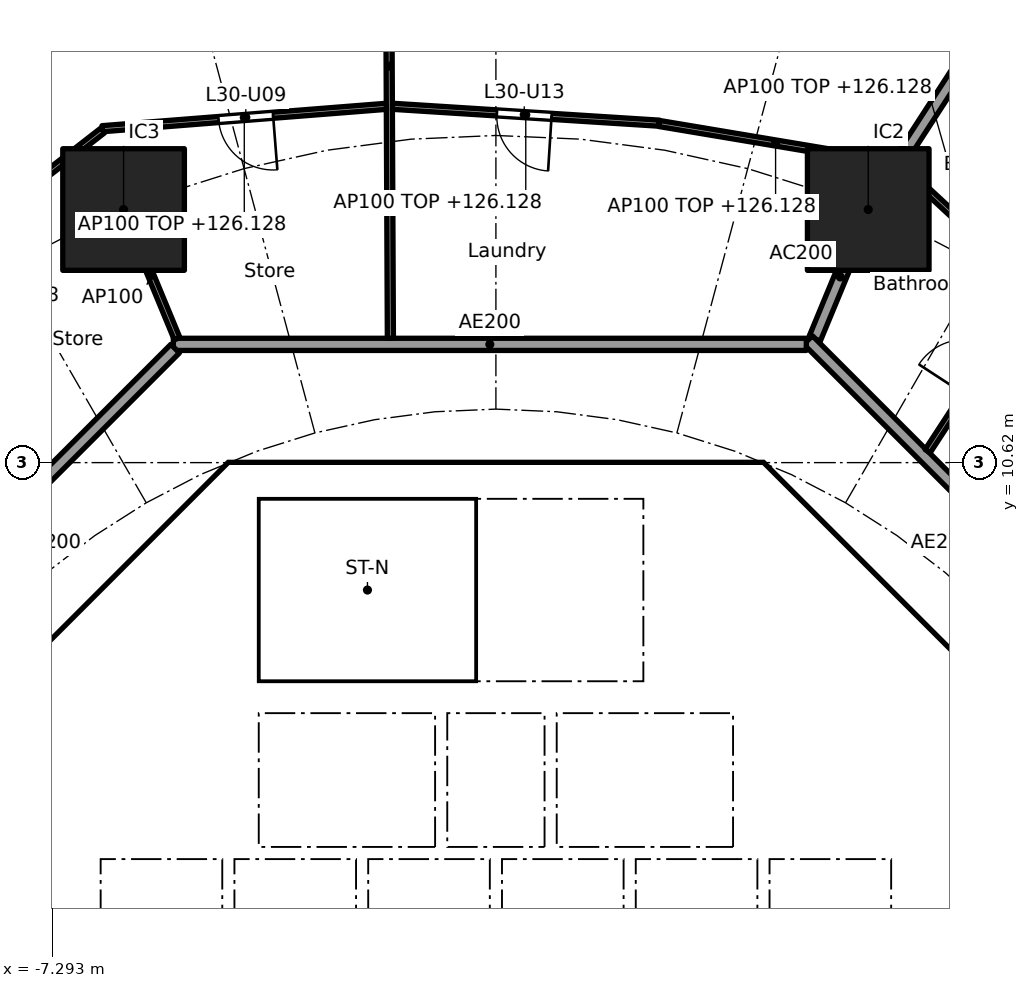
"""IFC4 building model, lengths in metres.
Left out: names, types, materials, properties, quantities, classifications, styles, units other than length and angle.
Written with IfcOpenShell. Run it as: python <this file> out.ifc"""

import sys

from ifc_helpers import new_model, si_unit, direction, frame, frame_2d, origin, origin_2d, place, context, subcontext, project, spatial, polyline, rectangle, outline, extrude, element, fill, save


model = new_model("IFC4")
c1 = context("Model", 3, precision=1e-05, world=origin(), true_north=direction((0.0, 1.0)))
c2 = subcontext(c1, "Body", "Model", "MODEL_VIEW")
j1 = project(units=[si_unit("LENGTHUNIT", "METRE"), si_unit("PLANEANGLEUNIT", "RADIAN")], contexts=[c1])
p1 = place(None, origin())
s1 = spatial("IfcSite", under=j1, at=p1, CompositionType="ELEMENT")
p2 = place(p1, origin())
s2 = spatial("IfcBuilding", under=s1, at=p2, CompositionType="ELEMENT")
p3 = place(p2, frame((0.0, 0.0, 123.3)))
s3 = spatial("IfcBuildingStorey", under=s2, at=p3, CompositionType="ELEMENT", Elevation=123.3)
for number, where, z_axis, x_axis in (
    (1, (6.123, 14.782, 0.0), (0.0, 0.0, 1.0), (1.0, 0.0, 0.0)),
    (2, (-6.123, 14.782, 0.0), (0.0, 0.0, 1.0), (1.0, 0.0, 0.0)),
):
    element("IfcColumn", number, at=place(p3, frame(where, z_axis=z_axis, x_axis=x_axis)), inside=s3, PredefinedType="COLUMN", context=c2, shape_type="SweptSolid", body=[
        extrude(rectangle(XDim=2.0, YDim=2.0, at=origin_2d()), origin(), (0.0, 0.0, 1.0), 3.7),
    ])
p4 = place(p3, frame((9.988, 4.613, 0.0), z_axis=(0.0, 0.0, 1.0), x_axis=(-0.707106781187, 0.707106781187, 0.0)))
e3 = element("IfcWall", 3, at=p4, inside=s3, PredefinedType="SHEAR", context=c2, shape_type="SweptSolid", body=[
    extrude(rectangle(XDim=7.602, YDim=0.6, at=frame_2d((3.801, 0.0))), origin(), (0.0, 0.0, 1.0), 3.44),
])
p5 = place(p4, frame((3.201, 0.0, 0.0)))
e4 = element("IfcOpeningElement", 4, at=p5, cuts=e3, PredefinedType="OPENING", context=c2, shape_type="SweptSolid", body=[
    extrude(rectangle(XDim=1.2, YDim=2.1, at=frame_2d((0.6, 1.05))), frame((0.0, 0.31, 0.0), z_axis=(0.0, -1.0, 0.0), x_axis=(1.0, 0.0, 0.0)), (0.0, 0.0, 1.0), 0.62),
])
p6 = place(p3, frame((-4.613, 9.988, 0.0), z_axis=(0.0, 0.0, 1.0), x_axis=(-0.707106781187, -0.707106781187, 0.0)))
e5 = element("IfcWall", 5, at=p6, inside=s3, PredefinedType="SHEAR", context=c2, shape_type="SweptSolid", body=[
    extrude(rectangle(XDim=7.602, YDim=0.6, at=frame_2d((3.801, 0.0))), origin(), (0.0, 0.0, 1.0), 3.44),
])
p7 = place(p6, frame((0.351, 0.0, 0.0)))
e6 = element("IfcOpeningElement", 6, at=p7, cuts=e5, PredefinedType="OPENING", context=c2, shape_type="SweptSolid", body=[
    extrude(rectangle(XDim=1.1, YDim=2.1, at=frame_2d((0.55, 1.05))), frame((0.0, 0.31, 0.0), z_axis=(0.0, -1.0, 0.0), x_axis=(1.0, 0.0, 0.0)), (0.0, 0.0, 1.0), 0.62),
])
p8 = place(p3, frame((-5.8, 4.3, 0.0), z_axis=(0.0, 0.0, 1.0), x_axis=(0.0, 1.0, 0.0)))
e7 = element("IfcWall", 7, at=p8, inside=s3, PredefinedType="PARTITIONING", context=c2, shape_type="SweptSolid", body=[
    extrude(rectangle(XDim=3.927, YDim=0.15, at=frame_2d((1.963, 0.0))), origin(), (0.0, 0.0, 1.0), 3.44),
])
p9 = place(p8, frame((1.551, 0.0, 0.0)))
e8 = element("IfcOpeningElement", 8, at=p9, cuts=e7, PredefinedType="OPENING", context=c2, shape_type="SweptSolid", body=[
    extrude(rectangle(XDim=0.9, YDim=2.1, at=frame_2d((0.45, 1.05))), frame((0.0, 0.085, 0.0), z_axis=(0.0, -1.0, 0.0), x_axis=(1.0, 0.0, 0.0)), (0.0, 0.0, 1.0), 0.17),
])
p10 = place(p3, frame((4.0, 4.3, 0.0), z_axis=(0.0, 0.0, 1.0), x_axis=(0.0, 1.0, 0.0)))
e9 = element("IfcWall", 9, at=p10, inside=s3, PredefinedType="SOLIDWALL", context=c2, shape_type="SweptSolid", body=[
    extrude(rectangle(XDim=2.2, YDim=0.2, at=frame_2d((1.1, 0.0))), origin(), (0.0, 0.0, 1.0), 3.44),
])
p11 = place(p10, frame((0.55, 0.0, 0.0)))
e10 = element("IfcOpeningElement", 10, at=p11, cuts=e9, PredefinedType="OPENING", context=c2, shape_type="SweptSolid", body=[
    extrude(rectangle(XDim=1.1, YDim=2.1, at=frame_2d((0.55, 1.05))), frame((0.0, 0.11, 0.0), z_axis=(0.0, -1.0, 0.0), x_axis=(1.0, 0.0, 0.0)), (0.0, 0.0, 1.0), 0.22),
])
p12 = place(p3, frame((-4.0, 4.3, 0.0), z_axis=(0.0, 0.0, 1.0), x_axis=(0.0, 1.0, 0.0)))
e11 = element("IfcWall", 11, at=p12, inside=s3, PredefinedType="SOLIDWALL", context=c2, shape_type="SweptSolid", body=[
    extrude(rectangle(XDim=2.2, YDim=0.2, at=frame_2d((1.1, 0.0))), origin(), (0.0, 0.0, 1.0), 3.44),
])
p13 = place(p12, frame((0.55, 0.0, 0.0)))
e12 = element("IfcOpeningElement", 12, at=p13, cuts=e11, PredefinedType="OPENING", context=c2, shape_type="SweptSolid", body=[
    extrude(rectangle(XDim=1.1, YDim=2.1, at=frame_2d((0.55, 1.05))), frame((0.0, 0.11, 0.0), z_axis=(0.0, -1.0, 0.0), x_axis=(1.0, 0.0, 0.0)), (0.0, 0.0, 1.0), 0.22),
])
p14 = place(p3, frame((6.7, 4.0, 0.0), z_axis=(0.0, 0.0, 1.0), x_axis=(1.0, 0.0, 0.0)))
e13 = element("IfcWall", 13, at=p14, inside=s3, PredefinedType="SOLIDWALL", context=c2, shape_type="SweptSolid", body=[
    extrude(rectangle(XDim=3.325, YDim=0.2, at=frame_2d((1.662, 0.0))), origin(), (0.0, 0.0, 1.0), 3.44),
])
p15 = place(p14, frame((1.25, 0.0, 0.0)))
e14 = element("IfcOpeningElement", 14, at=p15, cuts=e13, PredefinedType="OPENING", context=c2, shape_type="SweptSolid", body=[
    extrude(rectangle(XDim=1.1, YDim=2.1, at=frame_2d((0.55, 1.05))), frame((0.0, 0.11, 0.0), z_axis=(0.0, -1.0, 0.0), x_axis=(1.0, 0.0, 0.0)), (0.0, 0.0, 1.0), 0.22),
])
p16 = place(p3, frame((4.0, 7.025, 0.0), z_axis=(0.0, 0.0, 1.0), x_axis=(0.0, 1.0, 0.0)))
e15 = element("IfcWall", 15, at=p16, inside=s3, PredefinedType="SOLIDWALL", context=c2, shape_type="SweptSolid", body=[
    extrude(rectangle(XDim=3.0, YDim=0.2, at=frame_2d((1.5, 0.0))), origin(), (0.0, 0.0, 1.0), 3.44),
])
p17 = place(p16, frame((0.925, 0.0, 0.0)))
e16 = element("IfcOpeningElement", 16, at=p17, cuts=e15, PredefinedType="OPENING", context=c2, shape_type="SweptSolid", body=[
    extrude(rectangle(XDim=1.1, YDim=2.1, at=frame_2d((0.55, 1.05))), frame((0.0, 0.11, 0.0), z_axis=(0.0, -1.0, 0.0), x_axis=(1.0, 0.0, 0.0)), (0.0, 0.0, 1.0), 0.22),
])
p18 = place(p3, origin())
e17 = element("IfcWall", 17, at=p18, inside=s3, PredefinedType="SHEAR", context=c2, shape_type="SweptSolid", body=[
    extrude(outline(polyline([(-4.152, 10.025), (-4.401, 9.776), (-4.825, 10.2), (-4.401, 10.625), (4.401, 10.625), (4.825, 10.2), (4.401, 9.776), (4.152, 10.025), (-4.152, 10.025)])), origin(), (0.0, 0.0, 1.0), 3.44),
])
for number, where, z_axis, x_axis in (
    (18, (-0.9, 4.3, 0.0), (0.0, 0.0, 1.0), (0.0, 1.0, 0.0)),
    (19, (0.9, 4.3, 0.0), (0.0, 0.0, 1.0), (0.0, 1.0, 0.0)),
):
    element("IfcWall", number, at=place(p3, frame(where, z_axis=z_axis, x_axis=x_axis)), inside=s3, PredefinedType="SOLIDWALL", context=c2, shape_type="SweptSolid", body=[
        extrude(rectangle(XDim=2.2, YDim=0.2, at=frame_2d((1.1, 0.0))), origin(), (0.0, 0.0, 1.0), 3.44),
    ])
p19 = place(p3, origin())
e20 = element("IfcWall", 20, at=p19, inside=s3, PredefinedType="SOLIDWALL", context=c2, shape_type="SweptSolid", body=[
    extrude(outline(polyline([(-6.5, 2.1), (-6.7, 2.1), (-6.7, 4.3), (6.7, 4.3), (6.7, 2.1), (6.5, 2.1), (6.5, 4.1), (4.5, 4.1), (4.5, 2.1), (4.3, 2.1), (4.3, 4.1), (2.3, 4.1), (2.3, 2.1), (2.1, 2.1), (2.1, 4.1), (0.1, 4.1), (0.1, 2.1), (-0.1, 2.1), (-0.1, 4.1), (-2.1, 4.1), (-2.1, 2.1), (-2.3, 2.1), (-2.3, 4.1), (-4.3, 4.1), (-4.3, 2.1), (-4.5, 2.1), (-4.5, 4.1), (-6.5, 4.1), (-6.5, 2.1)])), origin(), (0.0, 0.0, 1.0), 3.44),
])
p20 = place(p3, frame((-10.025, 4.0, 0.0), z_axis=(0.0, 0.0, 1.0), x_axis=(1.0, 0.0, 0.0)))
e21 = element("IfcWall", 21, at=p20, inside=s3, PredefinedType="PARTITIONING", context=c2, shape_type="SweptSolid", body=[
    extrude(rectangle(XDim=3.325, YDim=0.2, at=frame_2d((1.662, 0.0))), origin(), (0.0, 0.0, 1.0), 3.44),
])
p21 = place(p3, origin())
e22 = element("IfcWall", 22, at=p21, inside=s3, PredefinedType="SOLIDWALL", context=c2, shape_type="SweptSolid", body=[
    extrude(outline(polyline([(-3.9, 7.025), (-4.1, 7.025), (-4.1, 10.025), (-3.9, 10.025), (-3.9, 7.025)])), origin(), (0.0, 0.0, 1.0), 3.44),
])
p22 = place(p3, origin())
e23 = element("IfcWall", 23, at=p22, inside=s3, PredefinedType="SOLIDWALL", context=c2, shape_type="SweptSolid", body=[
    extrude(outline(polyline([(4.1, 6.5), (-4.1, 6.5), (-4.1, 7.025), (4.1, 7.025), (4.1, 6.5)])), origin(), (0.0, 0.0, 1.0), 3.44),
])
p23 = place(p3, origin())
e24 = element("IfcWall", 24, at=p23, inside=s3, PredefinedType="SOLIDWALL", context=c2, shape_type="SweptSolid", body=[
    extrude(outline(polyline([(7.025, -3.9), (6.7, -3.9), (6.7, 3.9), (7.025, 3.9), (7.025, -3.9)])), origin(), (0.0, 0.0, 1.0), 3.44),
])
p24 = place(p3, frame((5.243, 12.657, 0.0), z_axis=(0.0, 0.0, 1.0), x_axis=(0.38273085373, 0.923859888513, 0.0)))
e25 = element("IfcWall", 25, at=p24, inside=s3, PredefinedType="PARTITIONING", context=c2, shape_type="SweptSolid", body=[
    extrude(rectangle(XDim=2.199, YDim=0.2, at=frame_2d((1.1, 0.0))), origin(), (0.0, 0.0, 1.0), 3.44),
])
p25 = place(p3, frame((6.15, 14.824, 0.0), z_axis=(0.0, 0.0, 1.0), x_axis=(0.543695254109, 0.839282711998, 0.0)))
e26 = element("IfcWall", 26, at=p25, inside=s3, PredefinedType="PARTITIONING", context=c2, shape_type="SweptSolid", body=[
    extrude(rectangle(XDim=8.731, YDim=0.2, at=frame_2d((4.366, 0.0))), origin(), (0.0, 0.0, 1.0), 2.828),
])
p26 = place(p3, frame((12.635, 5.134, 0.0), z_axis=(0.0, 0.0, 1.0), x_axis=(-0.707106781187, 0.707106781187, 0.0)))
e27 = element("IfcWall", 27, at=p26, inside=s3, PredefinedType="PARTITIONING", context=c2, shape_type="SweptSolid", body=[
    extrude(rectangle(XDim=10.609, YDim=0.2, at=frame_2d((5.305, 0.0))), origin(), (0.0, 0.0, 1.0), 3.44),
])
p27 = place(p26, frame((4.804, 0.0, 0.0)))
e28 = element("IfcOpeningElement", 28, at=p27, cuts=e27, PredefinedType="OPENING", context=c2, shape_type="SweptSolid", body=[
    extrude(rectangle(XDim=1.0, YDim=2.1, at=frame_2d((0.5, 1.05))), frame((0.0, 0.11, 0.0), z_axis=(0.0, -1.0, 0.0), x_axis=(1.0, 0.0, 0.0)), (0.0, 0.0, 1.0), 0.22),
])
p28 = place(p3, frame((5.104, 12.565, 0.0), z_axis=(0.0, 0.0, 1.0), x_axis=(-1.0, 0.0, 0.0)))
e29 = element("IfcWall", 29, at=p28, inside=s3, PredefinedType="PARTITIONING", context=c2, shape_type="SweptSolid", body=[
    extrude(rectangle(XDim=10.409, YDim=0.2, at=frame_2d((5.205, 0.0))), origin(), (0.0, 0.0, 1.0), 3.44),
])
p29 = place(p3, frame((-5.275, 12.494, 0.0), z_axis=(0.0, 0.0, 1.0), x_axis=(-0.707106781187, -0.707106781187, 0.0)))
e30 = element("IfcWall", 30, at=p29, inside=s3, PredefinedType="PARTITIONING", context=c2, shape_type="SweptSolid", body=[
    extrude(rectangle(XDim=10.209, YDim=0.2, at=frame_2d((5.104, 0.0))), origin(), (0.0, 0.0, 1.0), 3.44),
])
p30 = place(p29, frame((4.604, 0.0, 0.0)))
e31 = element("IfcOpeningElement", 31, at=p30, cuts=e30, PredefinedType="OPENING", context=c2, shape_type="SweptSolid", body=[
    extrude(rectangle(XDim=1.0, YDim=2.1, at=frame_2d((0.5, 1.05))), frame((0.0, 0.11, 0.0), z_axis=(0.0, -1.0, 0.0), x_axis=(1.0, 0.0, 0.0)), (0.0, 0.0, 1.0), 0.22),
])
p31 = place(p3, frame((7.099, 10.808, 0.0), z_axis=(0.0, 0.0, 1.0), x_axis=(0.546709757921, 0.837322184463, 0.0)))
e32 = element("IfcWall", 32, at=p31, inside=s3, PredefinedType="PARTITIONING", context=c2, shape_type="SweptSolid", body=[
    extrude(rectangle(XDim=3.134, YDim=0.1, at=frame_2d((1.567, 0.0))), origin(), (0.0, 0.0, 1.0), 2.756),
])
p32 = place(p31, frame((1.117, 0.0, 0.0)))
e33 = element("IfcOpeningElement", 33, at=p32, cuts=e32, PredefinedType="OPENING", context=c2, shape_type="SweptSolid", body=[
    extrude(rectangle(XDim=0.9, YDim=2.1, at=frame_2d((0.45, 1.05))), frame((0.0, 0.06, 0.0), z_axis=(0.0, -1.0, 0.0), x_axis=(1.0, 0.0, 0.0)), (0.0, 0.0, 1.0), 0.12),
])
p33 = place(p3, frame((8.803, 13.508, 0.0), z_axis=(0.0, 0.0, 1.0), x_axis=(-0.733124766325, 0.680094167745, 0.0)))
e34 = element("IfcWall", 34, at=p33, inside=s3, PredefinedType="PARTITIONING", context=c2, shape_type="SweptSolid", body=[
    extrude(rectangle(XDim=2.886, YDim=0.1, at=frame_2d((1.443, 0.0))), origin(), (0.0, 0.0, 1.0), 2.828),
])
p34 = place(p3, frame((6.515, 15.556, 0.0), z_axis=(0.0, 0.0, 1.0), x_axis=(-0.986271328884, 0.16513287323, 0.0)))
e35 = element("IfcWall", 35, at=p34, inside=s3, PredefinedType="PARTITIONING", context=c2, shape_type="SweptSolid", body=[
    extrude(rectangle(XDim=3.884, YDim=0.1, at=frame_2d((1.942, 0.0))), origin(), (0.0, 0.0, 1.0), 2.828),
])
p35 = place(p3, frame((2.685, 16.202, 0.0), z_axis=(0.0, 0.0, 1.0), x_axis=(-0.998000808042, 0.063201164138, 0.0)))
e36 = element("IfcWall", 36, at=p35, inside=s3, PredefinedType="PARTITIONING", context=c2, shape_type="SweptSolid", body=[
    extrude(rectangle(XDim=4.396, YDim=0.1, at=frame_2d((2.198, 0.0))), origin(), (0.0, 0.0, 1.0), 2.828),
])
p36 = place(p35, frame((1.773, 0.0, 0.0)))
e37 = element("IfcOpeningElement", 37, at=p36, cuts=e36, PredefinedType="OPENING", context=c2, shape_type="SweptSolid", body=[
    extrude(rectangle(XDim=0.9, YDim=2.1, at=frame_2d((0.45, 1.05))), frame((0.0, 0.06, 0.0), z_axis=(0.0, -1.0, 0.0), x_axis=(1.0, 0.0, 0.0)), (0.0, 0.0, 1.0), 0.12),
])
p37 = place(p3, frame((-1.735, 12.665, 0.0), z_axis=(0.0, 0.0, 1.0), x_axis=(-0.004474716456, 0.999989988406, 0.0)))
e38 = element("IfcWall", 38, at=p37, inside=s3, PredefinedType="PARTITIONING", context=c2, shape_type="SweptSolid", body=[
    extrude(rectangle(XDim=8.948, YDim=0.1, at=frame_2d((4.474, 0.0))), origin(), (0.0, 0.0, 1.0), 2.756),
])
p38 = place(p37, frame((5.908, 0.0, 0.0)))
e39 = element("IfcOpeningElement", 39, at=p38, cuts=e38, PredefinedType="OPENING", context=c2, shape_type="SweptSolid", body=[
    extrude(rectangle(XDim=0.9, YDim=2.1, at=frame_2d((0.45, 1.05))), frame((0.0, 0.06, 0.0), z_axis=(0.0, -1.0, 0.0), x_axis=(1.0, 0.0, 0.0)), (0.0, 0.0, 1.0), 0.12),
])
p39 = place(p3, frame((-1.802, 16.479, 0.0), z_axis=(0.0, 0.0, 1.0), x_axis=(-0.996909003513, -0.078564869469, 0.0)))
e40 = element("IfcWall", 40, at=p39, inside=s3, PredefinedType="PARTITIONING", context=c2, shape_type="SweptSolid", body=[
    extrude(rectangle(XDim=4.686, YDim=0.1, at=frame_2d((2.343, 0.0))), origin(), (0.0, 0.0, 1.0), 2.828),
])
p40 = place(p39, frame((1.868, 0.0, 0.0)))
e41 = element("IfcOpeningElement", 41, at=p40, cuts=e40, PredefinedType="OPENING", context=c2, shape_type="SweptSolid", body=[
    extrude(rectangle(XDim=0.9, YDim=2.1, at=frame_2d((0.45, 1.05))), frame((0.0, 0.06, 0.0), z_axis=(0.0, -1.0, 0.0), x_axis=(1.0, 0.0, 0.0)), (0.0, 0.0, 1.0), 0.12),
])
p41 = place(p3, frame((-5.243, 12.657, 0.0), z_axis=(0.0, 0.0, 1.0), x_axis=(-0.382719158442, 0.923864733477, 0.0)))
e42 = element("IfcWall", 42, at=p41, inside=s3, PredefinedType="PARTITIONING", context=c2, shape_type="SweptSolid", body=[
    extrude(rectangle(XDim=2.25, YDim=0.1, at=frame_2d((1.125, 0.0))), origin(), (0.0, 0.0, 1.0), 3.44),
])
p42 = place(p3, frame((-6.463, 16.084, 0.0), z_axis=(0.0, 0.0, 1.0), x_axis=(-0.789457442969, -0.613805299538, 0.0)))
e43 = element("IfcWall", 43, at=p42, inside=s3, PredefinedType="PARTITIONING", context=c2, shape_type="SweptSolid", body=[
    extrude(rectangle(XDim=3.997, YDim=0.1, at=frame_2d((1.999, 0.0))), origin(), (0.0, 0.0, 1.0), 2.828),
])
p43 = place(p11, origin())
e44 = element("IfcDoor", 44, at=p43, inside=s3, OperationType="DOUBLE_DOOR_SLIDING", PredefinedType="DOOR", context=c2, shape_type="SweptSolid", body=[
    extrude(rectangle(XDim=1.1, YDim=2.1, at=frame_2d((0.55, 1.05))), frame((0.0, 0.025, 0.0), z_axis=(0.0, -1.0, 0.0), x_axis=(1.0, 0.0, 0.0)), (0.0, 0.0, 1.0), 0.05),
])
fill(e10, e44)
p44 = place(p13, origin())
e45 = element("IfcDoor", 45, at=p44, inside=s3, OperationType="DOUBLE_DOOR_SLIDING", PredefinedType="DOOR", context=c2, shape_type="SweptSolid", body=[
    extrude(rectangle(XDim=1.1, YDim=2.1, at=frame_2d((0.55, 1.05))), frame((0.0, 0.025, 0.0), z_axis=(0.0, -1.0, 0.0), x_axis=(1.0, 0.0, 0.0)), (0.0, 0.0, 1.0), 0.05),
])
fill(e12, e45)
p45 = place(p17, origin())
e46 = element("IfcDoor", 46, at=p45, inside=s3, OperationType="SINGLE_SWING_RIGHT", PredefinedType="DOOR", context=c2, shape_type="SweptSolid", body=[
    extrude(rectangle(XDim=1.1, YDim=2.1, at=frame_2d((0.55, 1.05))), frame((0.0, 0.025, 0.0), z_axis=(0.0, -1.0, 0.0), x_axis=(1.0, 0.0, 0.0)), (0.0, 0.0, 1.0), 0.05),
])
fill(e16, e46)
p46 = place(p9, origin())
e47 = element("IfcDoor", 47, at=p46, inside=s3, OperationType="SINGLE_SWING_LEFT", PredefinedType="DOOR", context=c2, shape_type="SweptSolid", body=[
    extrude(rectangle(XDim=0.9, YDim=2.1, at=frame_2d((0.45, 1.05))), frame((0.0, 0.025, 0.0), z_axis=(0.0, -1.0, 0.0), x_axis=(1.0, 0.0, 0.0)), (0.0, 0.0, 1.0), 0.05),
])
fill(e8, e47)
p47 = place(p5, origin())
e48 = element("IfcDoor", 48, at=p47, inside=s3, OperationType="SINGLE_SWING_RIGHT", PredefinedType="DOOR", context=c2, shape_type="SweptSolid", body=[
    extrude(rectangle(XDim=1.2, YDim=2.1, at=frame_2d((0.6, 1.05))), frame((0.0, 0.025, 0.0), z_axis=(0.0, -1.0, 0.0), x_axis=(1.0, 0.0, 0.0)), (0.0, 0.0, 1.0), 0.05),
])
fill(e4, e48)
p48 = place(p7, origin())
e49 = element("IfcDoor", 49, at=p48, inside=s3, OperationType="SINGLE_SWING_RIGHT", PredefinedType="DOOR", context=c2, shape_type="SweptSolid", body=[
    extrude(rectangle(XDim=1.1, YDim=2.1, at=frame_2d((0.55, 1.05))), frame((0.0, 0.025, 0.0), z_axis=(0.0, -1.0, 0.0), x_axis=(1.0, 0.0, 0.0)), (0.0, 0.0, 1.0), 0.05),
])
fill(e6, e49)
p49 = place(p40, origin())
e50 = element("IfcDoor", 50, at=p49, inside=s3, OperationType="SINGLE_SWING_LEFT", PredefinedType="DOOR", context=c2, shape_type="SweptSolid", body=[
    extrude(rectangle(XDim=0.9, YDim=2.1, at=frame_2d((0.45, 1.05))), frame((0.0, 0.025, 0.0), z_axis=(0.0, -1.0, 0.0), x_axis=(1.0, 0.0, 0.0)), (0.0, 0.0, 1.0), 0.05),
])
fill(e41, e50)
p50 = place(p36, origin())
e51 = element("IfcDoor", 51, at=p50, inside=s3, OperationType="SINGLE_SWING_LEFT", PredefinedType="DOOR", context=c2, shape_type="SweptSolid", body=[
    extrude(rectangle(XDim=0.9, YDim=2.1, at=frame_2d((0.45, 1.05))), frame((0.0, 0.025, 0.0), z_axis=(0.0, -1.0, 0.0), x_axis=(1.0, 0.0, 0.0)), (0.0, 0.0, 1.0), 0.05),
])
fill(e37, e51)
save(model, sys.argv[1])
